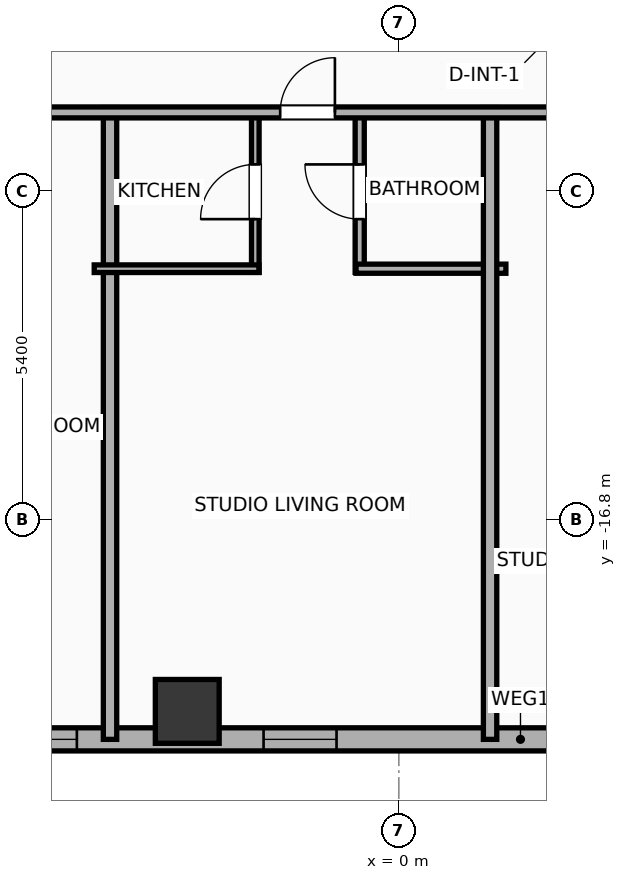
"""IFC4 building model, lengths in metres.
Left out: names, types, materials, properties, quantities, classifications, styles, units other than length and angle.
Written with IfcOpenShell. Run it as: python <this file> out.ifc"""

import sys

from ifc_helpers import new_model, si_unit, direction, frame, frame_2d, origin, origin_2d, place, context, subcontext, project, spatial, rectangle, hollow_rectangle, extrude, element, fill, save


model = new_model("IFC4")
c1 = context("Model", 3, precision=1e-05, world=origin(), true_north=direction((0.0, 1.0)))
c2 = subcontext(c1, "Body", "Model", "MODEL_VIEW")
j1 = project(units=[si_unit("LENGTHUNIT", "METRE"), si_unit("PLANEANGLEUNIT", "RADIAN")], contexts=[c1])
p1 = place(None, origin())
s1 = spatial("IfcSite", under=j1, at=p1, CompositionType="ELEMENT")
p2 = place(p1, origin())
s2 = spatial("IfcBuilding", under=s1, at=p2, CompositionType="ELEMENT")
p3 = place(p2, frame((0.0, 0.0, 124.8)))
s3 = spatial("IfcBuildingStorey", under=s2, at=p3, CompositionType="ELEMENT", Elevation=124.8)
p4 = place(p3, frame((-3.48, -19.95, 0.0), z_axis=(0.0, 0.0, 1.0), x_axis=(1.0, 0.0, 0.0)))
e1 = element("IfcColumn", 1, at=p4, inside=s3, PredefinedType="COLUMN", context=c2, shape_type="SweptSolid", body=[
    extrude(hollow_rectangle(XDim=1.05, YDim=1.05, WallThickness=0.036, at=origin_2d()), origin(), (0.0, 0.0, 1.0), 3.9),
])
p5 = place(p3, frame((29.381, -20.41, 0.0), z_axis=(0.0, 0.0, 1.0), x_axis=(-1.0, 0.0, 0.0)))
e2 = element("IfcWall", 2, at=p5, inside=s3, PredefinedType="ELEMENTEDWALL", context=c2, shape_type="SweptSolid", body=[
    extrude(rectangle(XDim=54.763, YDim=0.38, at=frame_2d((27.381, 0.0))), origin(), (0.0, 0.0, 1.0), 3.65),
])
p6 = place(p5, frame((5.645, 0.0, 0.75)))
e3 = element("IfcOpeningElement", 3, at=p6, cuts=e2, PredefinedType="OPENING", context=c2, shape_type="SweptSolid", body=[
    extrude(rectangle(XDim=2.4, YDim=2.1, at=frame_2d((1.2, 1.05))), frame((0.0, 0.2, 0.0), z_axis=(0.0, -1.0, 0.0), x_axis=(1.0, 0.0, 0.0)), (0.0, 0.0, 1.0), 0.4),
])
p7 = place(p5, frame((18.486, 0.0, 0.75)))
e4 = element("IfcOpeningElement", 4, at=p7, cuts=e2, PredefinedType="OPENING", context=c2, shape_type="SweptSolid", body=[
    extrude(rectangle(XDim=2.4, YDim=2.1, at=frame_2d((1.2, 1.05))), frame((0.0, 0.2, 0.0), z_axis=(0.0, -1.0, 0.0), x_axis=(1.0, 0.0, 0.0)), (0.0, 0.0, 1.0), 0.4),
])
p8 = place(p5, frame((34.677, 0.0, 0.75)))
e5 = element("IfcOpeningElement", 5, at=p8, cuts=e2, PredefinedType="OPENING", context=c2, shape_type="SweptSolid", body=[
    extrude(rectangle(XDim=2.4, YDim=2.1, at=frame_2d((1.2, 1.05))), frame((0.0, 0.2, 0.0), z_axis=(0.0, -1.0, 0.0), x_axis=(1.0, 0.0, 0.0)), (0.0, 0.0, 1.0), 0.4),
])
p9 = place(p5, frame((46.717, 0.0, 0.75)))
e6 = element("IfcOpeningElement", 6, at=p9, cuts=e2, PredefinedType="OPENING", context=c2, shape_type="SweptSolid", body=[
    extrude(rectangle(XDim=2.4, YDim=2.1, at=frame_2d((1.2, 1.05))), frame((0.0, 0.2, 0.0), z_axis=(0.0, -1.0, 0.0), x_axis=(1.0, 0.0, 0.0)), (0.0, 0.0, 1.0), 0.4),
])
p10 = place(p5, frame((52.719, 0.0, 0.75)))
e7 = element("IfcOpeningElement", 7, at=p10, cuts=e2, PredefinedType="OPENING", context=c2, shape_type="SweptSolid", body=[
    extrude(rectangle(XDim=1.2, YDim=2.05, at=frame_2d((0.6, 1.025))), frame((0.0, 0.2, 0.0), z_axis=(0.0, -1.0, 0.0), x_axis=(1.0, 0.0, 0.0)), (0.0, 0.0, 1.0), 0.4),
])
p11 = place(p5, frame((50.786, 0.0, 0.75)))
e8 = element("IfcOpeningElement", 8, at=p11, cuts=e2, PredefinedType="OPENING", context=c2, shape_type="SweptSolid", body=[
    extrude(rectangle(XDim=1.2, YDim=2.05, at=frame_2d((0.6, 1.025))), frame((0.0, 0.2, 0.0), z_axis=(0.0, -1.0, 0.0), x_axis=(1.0, 0.0, 0.0)), (0.0, 0.0, 1.0), 0.4),
])
p12 = place(p5, frame((41.858, 0.0, 0.75)))
e9 = element("IfcOpeningElement", 9, at=p12, cuts=e2, PredefinedType="OPENING", context=c2, shape_type="SweptSolid", body=[
    extrude(rectangle(XDim=1.2, YDim=2.05, at=frame_2d((0.6, 1.025))), frame((0.0, 0.2, 0.0), z_axis=(0.0, -1.0, 0.0), x_axis=(1.0, 0.0, 0.0)), (0.0, 0.0, 1.0), 0.4),
])
p13 = place(p5, frame((38.556, 0.0, 0.75)))
e10 = element("IfcOpeningElement", 10, at=p13, cuts=e2, PredefinedType="OPENING", context=c2, shape_type="SweptSolid", body=[
    extrude(rectangle(XDim=1.2, YDim=2.05, at=frame_2d((0.6, 1.025))), frame((0.0, 0.2, 0.0), z_axis=(0.0, -1.0, 0.0), x_axis=(1.0, 0.0, 0.0)), (0.0, 0.0, 1.0), 0.4),
])
p14 = place(p5, frame((30.406, 0.0, 0.75)))
e11 = element("IfcOpeningElement", 11, at=p14, cuts=e2, PredefinedType="OPENING", context=c2, shape_type="SweptSolid", body=[
    extrude(rectangle(XDim=1.2, YDim=2.05, at=frame_2d((0.6, 1.025))), frame((0.0, 0.2, 0.0), z_axis=(0.0, -1.0, 0.0), x_axis=(1.0, 0.0, 0.0)), (0.0, 0.0, 1.0), 0.4),
])
p15 = place(p5, frame((25.434, 0.0, 0.75)))
e12 = element("IfcOpeningElement", 12, at=p15, cuts=e2, PredefinedType="OPENING", context=c2, shape_type="SweptSolid", body=[
    extrude(rectangle(XDim=1.2, YDim=2.05, at=frame_2d((0.6, 1.025))), frame((0.0, 0.2, 0.0), z_axis=(0.0, -1.0, 0.0), x_axis=(1.0, 0.0, 0.0)), (0.0, 0.0, 1.0), 0.4),
])
p16 = place(p5, frame((22.669, 0.0, 0.75)))
e13 = element("IfcOpeningElement", 13, at=p16, cuts=e2, PredefinedType="OPENING", context=c2, shape_type="SweptSolid", body=[
    extrude(rectangle(XDim=1.2, YDim=2.05, at=frame_2d((0.6, 1.025))), frame((0.0, 0.2, 0.0), z_axis=(0.0, -1.0, 0.0), x_axis=(1.0, 0.0, 0.0)), (0.0, 0.0, 1.0), 0.4),
])
p17 = place(p5, frame((15.954, 0.0, 0.75)))
e14 = element("IfcOpeningElement", 14, at=p17, cuts=e2, PredefinedType="OPENING", context=c2, shape_type="SweptSolid", body=[
    extrude(rectangle(XDim=1.2, YDim=2.05, at=frame_2d((0.6, 1.025))), frame((0.0, 0.2, 0.0), z_axis=(0.0, -1.0, 0.0), x_axis=(1.0, 0.0, 0.0)), (0.0, 0.0, 1.0), 0.4),
])
p18 = place(p5, frame((11.698, 0.0, 0.75)))
e15 = element("IfcOpeningElement", 15, at=p18, cuts=e2, PredefinedType="OPENING", context=c2, shape_type="SweptSolid", body=[
    extrude(rectangle(XDim=1.2, YDim=2.05, at=frame_2d((0.6, 1.025))), frame((0.0, 0.2, 0.0), z_axis=(0.0, -1.0, 0.0), x_axis=(1.0, 0.0, 0.0)), (0.0, 0.0, 1.0), 0.4),
])
p19 = place(p5, frame((3.225, 0.0, 0.75)))
e16 = element("IfcOpeningElement", 16, at=p19, cuts=e2, PredefinedType="OPENING", context=c2, shape_type="SweptSolid", body=[
    extrude(rectangle(XDim=1.2, YDim=2.05, at=frame_2d((0.6, 1.025))), frame((0.0, 0.2, 0.0), z_axis=(0.0, -1.0, 0.0), x_axis=(1.0, 0.0, 0.0)), (0.0, 0.0, 1.0), 0.4),
])
p20 = place(p5, frame((1.13, 0.0, 0.75)))
e17 = element("IfcOpeningElement", 17, at=p20, cuts=e2, PredefinedType="OPENING", context=c2, shape_type="SweptSolid", body=[
    extrude(rectangle(XDim=1.2, YDim=2.05, at=frame_2d((0.6, 1.025))), frame((0.0, 0.2, 0.0), z_axis=(0.0, -1.0, 0.0), x_axis=(1.0, 0.0, 0.0)), (0.0, 0.0, 1.0), 0.4),
])
p21 = place(p3, frame((-4.75, -20.41, 0.0), z_axis=(0.0, 0.0, 1.0), x_axis=(0.0, 1.0, 0.0)))
e18 = element("IfcWall", 18, at=p21, inside=s3, PredefinedType="PARTITIONING", context=c2, shape_type="SweptSolid", body=[
    extrude(rectangle(XDim=10.39, YDim=0.22, at=frame_2d((5.195, 0.0))), origin(), (0.0, 0.0, 1.0), 3.65),
])
p22 = place(p3, frame((-2.361, -12.73, 0.0), z_axis=(0.0, 0.0, 1.0), x_axis=(0.0, 1.0, 0.0)))
e19 = element("IfcWall", 19, at=p22, inside=s3, PredefinedType="PARTITIONING", context=c2, shape_type="SweptSolid", body=[
    extrude(rectangle(XDim=2.65, YDim=0.125, at=frame_2d((1.325, 0.0))), origin(), (0.0, 0.0, 1.0), 3.65),
])
p23 = place(p22, frame((0.875, 0.0, 0.0)))
e20 = element("IfcOpeningElement", 20, at=p23, cuts=e19, PredefinedType="OPENING", context=c2, shape_type="SweptSolid", body=[
    extrude(rectangle(XDim=0.9, YDim=2.05, at=frame_2d((0.45, 1.025))), frame((0.0, 0.073, 0.0), z_axis=(0.0, -1.0, 0.0), x_axis=(1.0, 0.0, 0.0)), (0.0, 0.0, 1.0), 0.145),
])
p24 = place(p3, frame((-0.644, -12.73, 0.0), z_axis=(0.0, 0.0, 1.0), x_axis=(0.0, 1.0, 0.0)))
e21 = element("IfcWall", 21, at=p24, inside=s3, PredefinedType="PLUMBINGWALL", context=c2, shape_type="SweptSolid", body=[
    extrude(rectangle(XDim=2.65, YDim=0.15, at=frame_2d((1.325, 0.0))), origin(), (0.0, 0.0, 1.0), 3.65),
])
p25 = place(p24, frame((0.875, 0.0, 0.0)))
e22 = element("IfcOpeningElement", 22, at=p25, cuts=e21, PredefinedType="OPENING", context=c2, shape_type="SweptSolid", body=[
    extrude(rectangle(XDim=0.9, YDim=2.05, at=frame_2d((0.45, 1.025))), frame((0.0, 0.085, 0.0), z_axis=(0.0, -1.0, 0.0), x_axis=(1.0, 0.0, 0.0)), (0.0, 0.0, 1.0), 0.17),
])
p26 = place(p3, frame((-5.01, -12.67, 0.0), z_axis=(0.0, 0.0, 1.0), x_axis=(1.0, 0.0, 0.0)))
e23 = element("IfcWall", 23, at=p26, inside=s3, PredefinedType="PARTITIONING", context=c2, shape_type="SweptSolid", body=[
    extrude(rectangle(XDim=2.709, YDim=0.125, at=frame_2d((1.354, 0.0))), origin(), (0.0, 0.0, 1.0), 3.65),
])
p27 = place(p3, frame((-0.704, -12.67, 0.0), z_axis=(0.0, 0.0, 1.0), x_axis=(1.0, 0.0, 0.0)))
e24 = element("IfcWall", 24, at=p27, inside=s3, PredefinedType="PLUMBINGWALL", context=c2, shape_type="SweptSolid", body=[
    extrude(rectangle(XDim=2.464, YDim=0.15, at=frame_2d((1.232, 0.0))), origin(), (0.0, 0.0, 1.0), 3.65),
])
p28 = place(p3, frame((1.5, -20.41, 0.0), z_axis=(0.0, 0.0, 1.0), x_axis=(0.0, 1.0, 0.0)))
e25 = element("IfcWall", 25, at=p28, inside=s3, PredefinedType="PARTITIONING", context=c2, shape_type="SweptSolid", body=[
    extrude(rectangle(XDim=10.39, YDim=0.22, at=frame_2d((5.195, 0.0))), origin(), (0.0, 0.0, 1.0), 3.65),
])
p29 = place(p3, frame((-29.21, -10.1, 0.0), z_axis=(0.0, 0.0, 1.0), x_axis=(1.0, 0.0, 0.0)))
e26 = element("IfcWall", 26, at=p29, inside=s3, PredefinedType="PARTITIONING", context=c2, shape_type="SweptSolid", body=[
    extrude(rectangle(XDim=62.42, YDim=0.18, at=frame_2d((31.21, 0.0))), origin(), (0.0, 0.0, 1.0), 3.65),
])
p30 = place(p29, frame((2.671, 0.0, 0.0)))
e27 = element("IfcOpeningElement", 27, at=p30, cuts=e26, PredefinedType="OPENING", context=c2, shape_type="SweptSolid", body=[
    extrude(rectangle(XDim=0.9, YDim=2.05, at=frame_2d((0.45, 1.025))), frame((0.0, 0.1, 0.0), z_axis=(0.0, -1.0, 0.0), x_axis=(1.0, 0.0, 0.0)), (0.0, 0.0, 1.0), 0.2),
])
p31 = place(p29, frame((9.637, 0.0, 0.0)))
e28 = element("IfcOpeningElement", 28, at=p31, cuts=e26, PredefinedType="OPENING", context=c2, shape_type="SweptSolid", body=[
    extrude(rectangle(XDim=1.15, YDim=2.05, at=frame_2d((0.575, 1.025))), frame((0.0, 0.1, 0.0), z_axis=(0.0, -1.0, 0.0), x_axis=(1.0, 0.0, 0.0)), (0.0, 0.0, 1.0), 0.2),
])
p32 = place(p29, frame((14.843, 0.0, 0.0)))
e29 = element("IfcOpeningElement", 29, at=p32, cuts=e26, PredefinedType="OPENING", context=c2, shape_type="SweptSolid", body=[
    extrude(rectangle(XDim=0.9, YDim=2.05, at=frame_2d((0.45, 1.025))), frame((0.0, 0.1, 0.0), z_axis=(0.0, -1.0, 0.0), x_axis=(1.0, 0.0, 0.0)), (0.0, 0.0, 1.0), 0.2),
])
p33 = place(p29, frame((21.958, 0.0, 0.0)))
e30 = element("IfcOpeningElement", 30, at=p33, cuts=e26, PredefinedType="OPENING", context=c2, shape_type="SweptSolid", body=[
    extrude(rectangle(XDim=1.15, YDim=2.05, at=frame_2d((0.575, 1.025))), frame((0.0, 0.1, 0.0), z_axis=(0.0, -1.0, 0.0), x_axis=(1.0, 0.0, 0.0)), (0.0, 0.0, 1.0), 0.2),
])
p34 = place(p29, frame((27.258, 0.0, 0.0)))
e31 = element("IfcOpeningElement", 31, at=p34, cuts=e26, PredefinedType="OPENING", context=c2, shape_type="SweptSolid", body=[
    extrude(rectangle(XDim=0.9, YDim=2.05, at=frame_2d((0.45, 1.025))), frame((0.0, 0.1, 0.0), z_axis=(0.0, -1.0, 0.0), x_axis=(1.0, 0.0, 0.0)), (0.0, 0.0, 1.0), 0.2),
])
p35 = place(p29, frame((32.014, 0.0, 0.0)))
e32 = element("IfcOpeningElement", 32, at=p35, cuts=e26, PredefinedType="OPENING", context=c2, shape_type="SweptSolid", body=[
    extrude(rectangle(XDim=1.15, YDim=2.05, at=frame_2d((0.575, 1.025))), frame((0.0, 0.1, 0.0), z_axis=(0.0, -1.0, 0.0), x_axis=(1.0, 0.0, 0.0)), (0.0, 0.0, 1.0), 0.2),
])
p36 = place(p29, frame((38.369, 0.0, 0.0)))
e33 = element("IfcOpeningElement", 33, at=p36, cuts=e26, PredefinedType="OPENING", context=c2, shape_type="SweptSolid", body=[
    extrude(rectangle(XDim=1.15, YDim=2.05, at=frame_2d((0.575, 1.025))), frame((0.0, 0.1, 0.0), z_axis=(0.0, -1.0, 0.0), x_axis=(1.0, 0.0, 0.0)), (0.0, 0.0, 1.0), 0.2),
])
p37 = place(p29, frame((46.09, 0.0, 0.0)))
e34 = element("IfcOpeningElement", 34, at=p37, cuts=e26, PredefinedType="OPENING", context=c2, shape_type="SweptSolid", body=[
    extrude(rectangle(XDim=0.9, YDim=2.05, at=frame_2d((0.45, 1.025))), frame((0.0, 0.1, 0.0), z_axis=(0.0, -1.0, 0.0), x_axis=(1.0, 0.0, 0.0)), (0.0, 0.0, 1.0), 0.2),
])
p38 = place(p29, frame((51.015, 0.0, 0.0)))
e35 = element("IfcOpeningElement", 35, at=p38, cuts=e26, PredefinedType="OPENING", context=c2, shape_type="SweptSolid", body=[
    extrude(rectangle(XDim=1.15, YDim=2.05, at=frame_2d((0.575, 1.025))), frame((0.0, 0.1, 0.0), z_axis=(0.0, -1.0, 0.0), x_axis=(1.0, 0.0, 0.0)), (0.0, 0.0, 1.0), 0.2),
])
p39 = place(p29, frame((58.93, 0.0, 0.0)))
e36 = element("IfcOpeningElement", 36, at=p39, cuts=e26, PredefinedType="OPENING", context=c2, shape_type="SweptSolid", body=[
    extrude(rectangle(XDim=0.9, YDim=2.05, at=frame_2d((0.45, 1.025))), frame((0.0, 0.1, 0.0), z_axis=(0.0, -1.0, 0.0), x_axis=(1.0, 0.0, 0.0)), (0.0, 0.0, 1.0), 0.2),
])
p40 = place(p8, origin())
e37 = element("IfcWindow", 37, at=p40, inside=s3, PartitioningType="SINGLE_PANEL", PredefinedType="WINDOW", context=c2, shape_type="SweptSolid", body=[
    extrude(rectangle(XDim=2.4, YDim=2.1, at=frame_2d((1.2, 1.05))), frame((0.0, 0.03, 0.0), z_axis=(0.0, -1.0, 0.0), x_axis=(1.0, 0.0, 0.0)), (0.0, 0.0, 1.0), 0.06),
])
fill(e5, e37)
p41 = place(p14, origin())
e38 = element("IfcWindow", 38, at=p41, inside=s3, PartitioningType="SINGLE_PANEL", PredefinedType="WINDOW", context=c2, shape_type="SweptSolid", body=[
    extrude(rectangle(XDim=1.2, YDim=2.05, at=frame_2d((0.6, 1.025))), frame((0.0, 0.03, 0.0), z_axis=(0.0, -1.0, 0.0), x_axis=(1.0, 0.0, 0.0)), (0.0, 0.0, 1.0), 0.06),
])
fill(e11, e38)
p42 = place(p23, origin())
e39 = element("IfcDoor", 39, at=p42, inside=s3, OperationType="SINGLE_SWING_LEFT", PredefinedType="DOOR", context=c2, shape_type="SweptSolid", body=[
    extrude(rectangle(XDim=0.9, YDim=2.05, at=frame_2d((0.45, 1.025))), frame((0.0, 0.025, 0.0), z_axis=(0.0, -1.0, 0.0), x_axis=(1.0, 0.0, 0.0)), (0.0, 0.0, 1.0), 0.05),
])
fill(e20, e39)
p43 = place(p25, origin())
e40 = element("IfcDoor", 40, at=p43, inside=s3, OperationType="SINGLE_SWING_RIGHT", PredefinedType="DOOR", context=c2, shape_type="SweptSolid", body=[
    extrude(rectangle(XDim=0.9, YDim=2.05, at=frame_2d((0.45, 1.025))), frame((0.0, 0.025, 0.0), z_axis=(0.0, -1.0, 0.0), x_axis=(1.0, 0.0, 0.0)), (0.0, 0.0, 1.0), 0.05),
])
fill(e22, e40)
p44 = place(p34, origin())
e41 = element("IfcDoor", 41, at=p44, inside=s3, OperationType="SINGLE_SWING_RIGHT", PredefinedType="DOOR", context=c2, shape_type="SweptSolid", body=[
    extrude(rectangle(XDim=0.9, YDim=2.05, at=frame_2d((0.45, 1.025))), frame((0.0, 0.025, 0.0), z_axis=(0.0, -1.0, 0.0), x_axis=(1.0, 0.0, 0.0)), (0.0, 0.0, 1.0), 0.05),
])
fill(e31, e41)
save(model, sys.argv[1])
